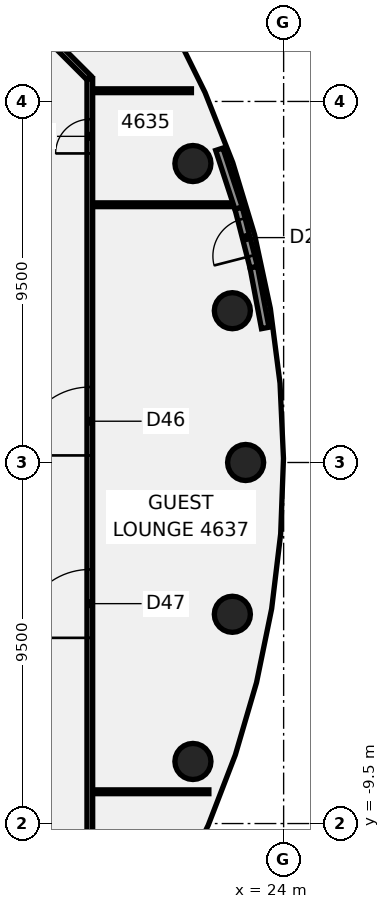
"""IFC4 building model, lengths in metres.
Left out: names, types, materials, properties, quantities, classifications, styles, units other than length and angle.
Written with IfcOpenShell. Run it as: python <this file> out.ifc"""

import sys

from ifc_helpers import new_model, si_unit, direction, frame, frame_2d, origin, origin_2d, place, context, subcontext, project, spatial, rectangle, circle, extrude, element, fill, save


model = new_model("IFC4")
c1 = context("Model", 3, precision=1e-05, world=origin(), true_north=direction((0.0, 1.0)))
c2 = subcontext(c1, "Body", "Model", "MODEL_VIEW")
j1 = project(units=[si_unit("LENGTHUNIT", "METRE"), si_unit("PLANEANGLEUNIT", "RADIAN")], contexts=[c1])
p1 = place(None, origin())
s1 = spatial("IfcSite", under=j1, at=p1, CompositionType="ELEMENT")
p2 = place(p1, origin())
s2 = spatial("IfcBuilding", under=s1, at=p2, CompositionType="ELEMENT")
p3 = place(p2, frame((0.0, 0.0, 186.1)))
s3 = spatial("IfcBuildingStorey", under=s2, at=p3, CompositionType="ELEMENT", Elevation=186.1)
for number, where, z_axis, x_axis in (
    (1, (23.0, 0.0, -0.14), (0.0, 0.0, 1.0), (1.0, 0.0, 0.0)),
    (2, (22.651, 3.994, -0.14), (0.0, 0.0, 1.0), (1.0, 0.0, 0.0)),
    (3, (21.613, 7.866, -0.14), (0.0, 0.0, 1.0), (1.0, 0.0, 0.0)),
    (4, (21.613, -7.866, -0.14), (0.0, 0.0, 1.0), (1.0, 0.0, 0.0)),
    (5, (22.651, -3.994, -0.14), (0.0, 0.0, 1.0), (1.0, 0.0, 0.0)),
):
    element("IfcColumn", number, at=place(p3, frame(where, z_axis=z_axis, x_axis=x_axis)), inside=s3, PredefinedType="COLUMN", context=c2, shape_type="SweptSolid", body=[
        extrude(circle(Radius=0.475, at=origin_2d()), origin(), (0.0, 0.0, 1.0), 3.6),
    ])
p4 = place(p3, frame((17.128, 11.872, 0.0), z_axis=(0.0, 0.0, 1.0), x_axis=(0.707106781187, -0.707106781187, 0.0)))
e6 = element("IfcWall", 6, at=p4, inside=s3, PredefinedType="PARTITIONING", context=c2, shape_type="SweptSolid", body=[
    extrude(rectangle(XDim=2.465, YDim=0.15, at=frame_2d((1.232, 0.0))), origin(), (0.0, 0.0, 1.0), 2.864),
])
p5 = place(p3, frame((18.955, -8.664, 0.0), z_axis=(0.0, 0.0, 1.0), x_axis=(1.0, 0.0, 0.0)))
e7 = element("IfcWall", 7, at=p5, inside=s3, PredefinedType="PARTITIONING", context=c2, shape_type="SweptSolid", body=[
    extrude(rectangle(XDim=3.078, YDim=0.1, at=frame_2d((1.539, 0.0))), origin(), (0.0, 0.0, 1.0), 2.864),
])
p6 = place(p3, frame((18.955, 6.782, 0.0), z_axis=(0.0, 0.0, 1.0), x_axis=(1.0, 0.0, 0.0)))
e8 = element("IfcWall", 8, at=p6, inside=s3, PredefinedType="PARTITIONING", context=c2, shape_type="SweptSolid", body=[
    extrude(rectangle(XDim=3.727, YDim=0.1, at=frame_2d((1.864, 0.0))), origin(), (0.0, 0.0, 1.0), 2.864),
])
p7 = place(p3, frame((18.955, 9.782, 0.0), z_axis=(0.0, 0.0, 1.0), x_axis=(1.0, 0.0, 0.0)))
e9 = element("IfcWall", 9, at=p7, inside=s3, PredefinedType="PARTITIONING", context=c2, shape_type="SweptSolid", body=[
    extrude(rectangle(XDim=2.618, YDim=0.1, at=frame_2d((1.309, 0.0))), origin(), (0.0, 0.0, 1.0), 2.864),
])
p8 = place(p3, frame((18.9, -10.1, 0.0), z_axis=(0.0, 0.0, 1.0), x_axis=(0.0, 1.0, 0.0)))
e10 = element("IfcWall", 10, at=p8, inside=s3, PredefinedType="PARTITIONING", context=c2, shape_type="SweptSolid", body=[
    extrude(rectangle(XDim=20.2, YDim=0.15, at=frame_2d((10.1, 0.0))), origin(), (0.0, 0.0, 1.0), 2.864),
])
p9 = place(p8, frame((18.232, 0.0, 0.0)))
e11 = element("IfcOpeningElement", 11, at=p9, cuts=e10, PredefinedType="OPENING", context=c2, shape_type="SweptSolid", body=[
    extrude(rectangle(XDim=0.9, YDim=2.1, at=frame_2d((0.45, 1.05))), frame((0.0, 0.085, 0.0), z_axis=(0.0, -1.0, 0.0), x_axis=(1.0, 0.0, 0.0)), (0.0, 0.0, 1.0), 0.17),
])
p10 = place(p8, frame((10.286, 0.0, 0.0)))
e12 = element("IfcOpeningElement", 12, at=p10, cuts=e10, PredefinedType="OPENING", context=c2, shape_type="SweptSolid", body=[
    extrude(rectangle(XDim=1.8, YDim=2.1, at=frame_2d((0.9, 1.05))), frame((0.0, 0.085, 0.0), z_axis=(0.0, -1.0, 0.0), x_axis=(1.0, 0.0, 0.0)), (0.0, 0.0, 1.0), 0.17),
])
p11 = place(p8, frame((5.486, 0.0, 0.0)))
e13 = element("IfcOpeningElement", 13, at=p11, cuts=e10, PredefinedType="OPENING", context=c2, shape_type="SweptSolid", body=[
    extrude(rectangle(XDim=1.8, YDim=2.1, at=frame_2d((0.9, 1.05))), frame((0.0, 0.085, 0.0), z_axis=(0.0, -1.0, 0.0), x_axis=(1.0, 0.0, 0.0)), (0.0, 0.0, 1.0), 0.17),
])
for number, where, z_axis, x_axis in (
    (14, (23.516, 3.54, 0.0), (0.0, 0.0, 1.0), (-0.186, 0.983, 0.0)),
    (15, (22.815, 6.692, 0.0), (0.0, 0.0, 1.0), (-0.311, 0.95, 0.0)),
):
    element("IfcWall", number, at=place(p3, frame(where, z_axis=z_axis, x_axis=x_axis)), inside=s3, PredefinedType="SOLIDWALL", context=c2, shape_type="SweptSolid", body=[
        extrude(rectangle(XDim=1.632, YDim=0.2, at=frame_2d((0.816, 0.0))), origin(), (0.0, 0.0, 1.0), 3.46),
    ])
p12 = place(p3, frame((23.213, 5.143, 0.0), z_axis=(0.0, 0.0, 1.0), x_axis=(-0.248926442894, 0.968522393148, 0.0)))
e16 = element("IfcWall", 16, at=p12, inside=s3, PredefinedType="SOLIDWALL", context=c2, shape_type="SweptSolid", body=[
    extrude(rectangle(XDim=1.599, YDim=0.2, at=frame_2d((0.799, 0.0))), origin(), (0.0, 0.0, 1.0), 3.46),
])
p13 = place(p12, frame((0.299, 0.0, 0.0)))
e17 = element("IfcOpeningElement", 17, at=p13, cuts=e16, PredefinedType="OPENING", context=c2, shape_type="SweptSolid", body=[
    extrude(rectangle(XDim=1.0, YDim=2.4, at=frame_2d((0.5, 1.2))), frame((0.0, 0.11, 0.0), z_axis=(0.0, -1.0, 0.0), x_axis=(1.0, 0.0, 0.0)), (0.0, 0.0, 1.0), 0.22),
])
p14 = place(p9, frame((0.9, 0.0, 0.0), z_axis=(0.0, 0.0, 1.0), x_axis=(-1.0, 0.0, 0.0)))
e18 = element("IfcDoor", 18, at=p14, inside=s3, OperationType="SINGLE_SWING_RIGHT", PredefinedType="DOOR", context=c2, shape_type="SweptSolid", body=[
    extrude(rectangle(XDim=0.9, YDim=2.1, at=frame_2d((0.45, 1.05))), frame((0.0, 0.025, 0.0), z_axis=(0.0, -1.0, 0.0), x_axis=(1.0, 0.0, 0.0)), (0.0, 0.0, 1.0), 0.05),
])
fill(e11, e18)
p15 = place(p10, frame((1.8, 0.0, 0.0), z_axis=(0.0, 0.0, 1.0), x_axis=(-1.0, 0.0, 0.0)))
e19 = element("IfcDoor", 19, at=p15, inside=s3, OperationType="DOUBLE_DOOR_SINGLE_SWING", PredefinedType="DOOR", context=c2, shape_type="SweptSolid", body=[
    extrude(rectangle(XDim=1.8, YDim=2.1, at=frame_2d((0.9, 1.05))), frame((0.0, 0.025, 0.0), z_axis=(0.0, -1.0, 0.0), x_axis=(1.0, 0.0, 0.0)), (0.0, 0.0, 1.0), 0.05),
])
fill(e12, e19)
p16 = place(p11, frame((1.8, 0.0, 0.0), z_axis=(0.0, 0.0, 1.0), x_axis=(-1.0, 0.0, 0.0)))
e20 = element("IfcDoor", 20, at=p16, inside=s3, OperationType="DOUBLE_DOOR_SINGLE_SWING", PredefinedType="DOOR", context=c2, shape_type="SweptSolid", body=[
    extrude(rectangle(XDim=1.8, YDim=2.1, at=frame_2d((0.9, 1.05))), frame((0.0, 0.025, 0.0), z_axis=(0.0, -1.0, 0.0), x_axis=(1.0, 0.0, 0.0)), (0.0, 0.0, 1.0), 0.05),
])
fill(e13, e20)
p17 = place(p13, origin())
e21 = element("IfcDoor", 21, at=p17, inside=s3, OperationType="SINGLE_SWING_LEFT", PredefinedType="DOOR", context=c2, shape_type="SweptSolid", body=[
    extrude(rectangle(XDim=1.0, YDim=2.4, at=frame_2d((0.5, 1.2))), frame((0.0, 0.025, 0.0), z_axis=(0.0, -1.0, 0.0), x_axis=(1.0, 0.0, 0.0)), (0.0, 0.0, 1.0), 0.05),
])
fill(e17, e21)
save(model, sys.argv[1])
